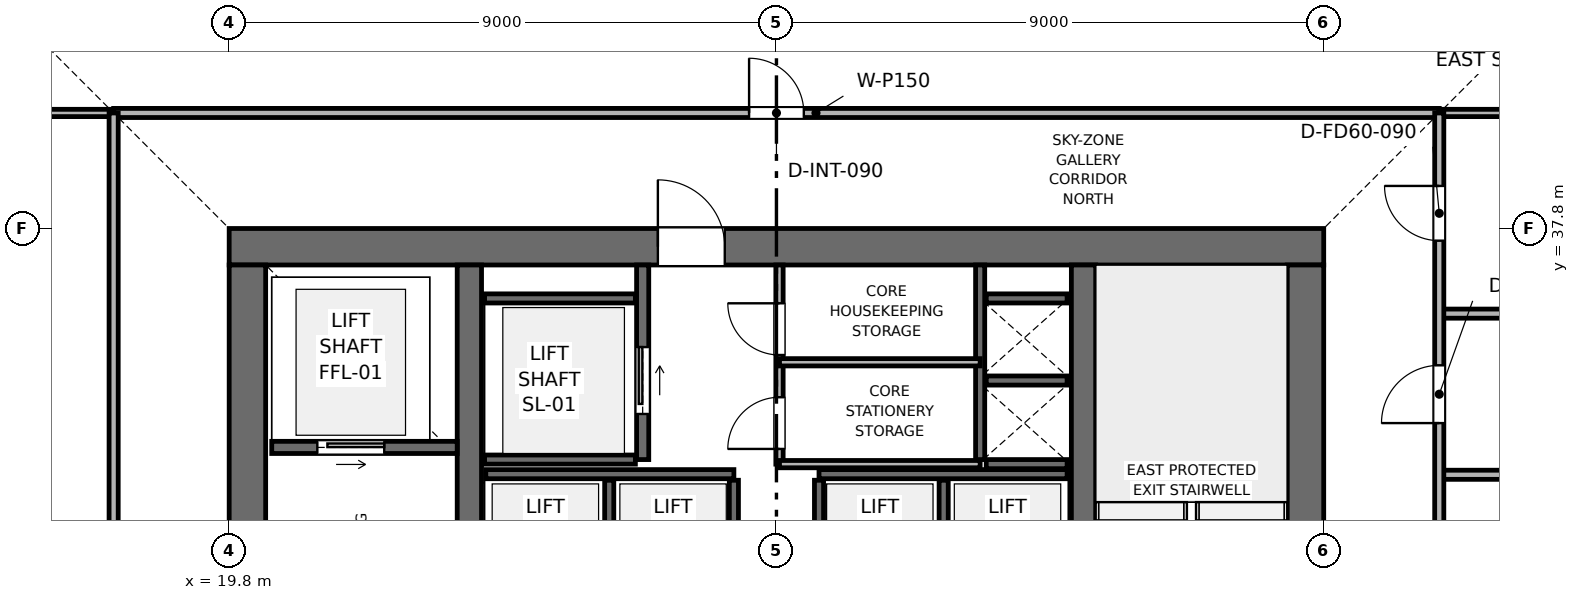
"""IFC4 building model, lengths in metres.
Left out: names, types, materials, properties, quantities, classifications, styles, units other than length and angle.
Written with IfcOpenShell. Run it as: python <this file> out.ifc"""

import sys

from ifc_helpers import new_model, si_unit, direction, frame, frame_2d, origin, place, context, subcontext, project, spatial, rectangle, extrude, element, fill, save


model = new_model("IFC4")
c1 = context("Model", 3, precision=1e-05, world=origin(), true_north=direction((0.0, 1.0)))
c2 = subcontext(c1, "Body", "Model", "MODEL_VIEW")
j1 = project(units=[si_unit("LENGTHUNIT", "METRE"), si_unit("PLANEANGLEUNIT", "RADIAN")], contexts=[c1])
p1 = place(None, origin())
s1 = spatial("IfcSite", under=j1, at=p1, CompositionType="ELEMENT")
p2 = place(p1, origin())
s2 = spatial("IfcBuilding", under=s1, at=p2, CompositionType="ELEMENT")
p3 = place(p2, frame((0.0, 0.0, 295.5)))
s3 = spatial("IfcBuildingStorey", under=s2, at=p3, CompositionType="ELEMENT", Elevation=295.5)
p4 = place(p3, frame((19.8, 37.5, 0.0), z_axis=(0.0, 0.0, 1.0), x_axis=(1.0, 0.0, 0.0)))
e1 = element("IfcWall", 1, at=p4, inside=s3, PredefinedType="SHEAR", context=c2, shape_type="SweptSolid", body=[
    extrude(rectangle(XDim=18.0, YDim=0.6, at=frame_2d((9.0, 0.0))), origin(), (0.0, 0.0, 1.0), 3.75),
])
p5 = place(p4, frame((7.05, 0.0, 0.0)))
e2 = element("IfcOpeningElement", 2, at=p5, cuts=e1, PredefinedType="OPENING", context=c2, shape_type="SweptSolid", body=[
    extrude(rectangle(XDim=1.1, YDim=2.15, at=frame_2d((0.55, 1.075))), frame((0.0, 0.31, 0.0), z_axis=(0.0, -1.0, 0.0), x_axis=(1.0, 0.0, 0.0)), (0.0, 0.0, 1.0), 0.62),
])
p6 = place(p3, frame((20.1, 20.4, 0.0), z_axis=(0.0, 0.0, 1.0), x_axis=(0.0, 1.0, 0.0)))
e3 = element("IfcWall", 3, at=p6, inside=s3, PredefinedType="SHEAR", context=c2, shape_type="SweptSolid", body=[
    extrude(rectangle(XDim=16.8, YDim=0.6, at=frame_2d((8.4, 0.0))), origin(), (0.0, 0.0, 1.0), 3.75),
])
p7 = place(p6, frame((10.4, 0.0, 0.0)))
e4 = element("IfcOpeningElement", 4, at=p7, cuts=e3, PredefinedType="OPENING", context=c2, shape_type="SweptSolid", body=[
    extrude(rectangle(XDim=1.1, YDim=2.15, at=frame_2d((0.55, 1.075))), frame((0.0, 0.31, 0.0), z_axis=(0.0, -1.0, 0.0), x_axis=(1.0, 0.0, 0.0)), (0.0, 0.0, 1.0), 0.62),
])
p8 = place(p3, frame((37.5, 20.4, 0.0), z_axis=(0.0, 0.0, 1.0), x_axis=(0.0, 1.0, 0.0)))
e5 = element("IfcWall", 5, at=p8, inside=s3, PredefinedType="SHEAR", context=c2, shape_type="SweptSolid", body=[
    extrude(rectangle(XDim=16.8, YDim=0.6, at=frame_2d((8.4, 0.0))), origin(), (0.0, 0.0, 1.0), 3.75),
])
p9 = place(p8, frame((4.9, 0.0, 0.0)))
e6 = element("IfcOpeningElement", 6, at=p9, cuts=e5, PredefinedType="OPENING", context=c2, shape_type="SweptSolid", body=[
    extrude(rectangle(XDim=1.1, YDim=2.15, at=frame_2d((0.55, 1.075))), frame((0.0, 0.31, 0.0), z_axis=(0.0, -1.0, 0.0), x_axis=(1.0, 0.0, 0.0)), (0.0, 0.0, 1.0), 0.62),
])
for number, where, z_axis, x_axis in (
    (7, (23.75, 20.4, 0.0), (0.0, 0.0, 1.0), (0.0, 1.0, 0.0)),
    (8, (33.85, 20.4, 0.0), (0.0, 0.0, 1.0), (0.0, 1.0, 0.0)),
):
    element("IfcWall", number, at=place(p3, frame(where, z_axis=z_axis, x_axis=x_axis)), inside=s3, PredefinedType="SHEAR", context=c2, shape_type="SweptSolid", body=[
        extrude(rectangle(XDim=16.8, YDim=0.4, at=frame_2d((8.4, 0.0))), origin(), (0.0, 0.0, 1.0), 3.75),
    ])
p10 = place(p3, frame((32.15, 34.0, 0.0), z_axis=(0.0, 0.0, 1.0), x_axis=(0.0, 1.0, 0.0)))
e9 = element("IfcWall", 9, at=p10, inside=s3, PredefinedType="SHEAR", context=c2, shape_type="SweptSolid", body=[
    extrude(rectangle(XDim=3.2, YDim=0.15, at=frame_2d((1.6, 0.0))), origin(), (0.0, 0.0, 1.0), 3.51),
])
for number, where, z_axis, x_axis in (
    (10, (32.25, 33.925, 0.0), (0.0, 0.0, 1.0), (1.0, 0.0, 0.0)),
    (11, (32.25, 35.3, 0.0), (0.0, 0.0, 1.0), (1.0, 0.0, 0.0)),
):
    element("IfcWall", number, at=place(p3, frame(where, z_axis=z_axis, x_axis=x_axis)), inside=s3, PredefinedType="SHEAR", context=c2, shape_type="SweptSolid", body=[
        extrude(rectangle(XDim=1.33, YDim=0.15, at=frame_2d((0.665, 0.0))), origin(), (0.0, 0.0, 1.0), 3.51),
    ])
p11 = place(p3, frame((20.5, 34.2, 0.0), z_axis=(0.0, 0.0, 1.0), x_axis=(1.0, 0.0, 0.0)))
e12 = element("IfcWall", 12, at=p11, inside=s3, PredefinedType="SHEAR", context=c2, shape_type="SweptSolid", body=[
    extrude(rectangle(XDim=3.05, YDim=0.2, at=frame_2d((1.525, 0.0))), origin(), (0.0, 0.0, 1.0), 3.51),
])
p12 = place(p11, frame((0.75, 0.0, 0.0)))
e13 = element("IfcOpeningElement", 13, at=p12, cuts=e12, PredefinedType="OPENING", context=c2, shape_type="SweptSolid", body=[
    extrude(rectangle(XDim=1.1, YDim=2.15, at=frame_2d((0.55, 1.075))), frame((0.0, 0.11, 0.0), z_axis=(0.0, -1.0, 0.0), x_axis=(1.0, 0.0, 0.0)), (0.0, 0.0, 1.0), 0.22),
])
p13 = place(p3, frame((26.6, 34.0, 0.0), z_axis=(0.0, 0.0, 1.0), x_axis=(0.0, 1.0, 0.0)))
e14 = element("IfcWall", 14, at=p13, inside=s3, PredefinedType="SHEAR", context=c2, shape_type="SweptSolid", body=[
    extrude(rectangle(XDim=3.2, YDim=0.2, at=frame_2d((1.6, 0.0))), origin(), (0.0, 0.0, 1.0), 3.51),
])
p14 = place(p13, frame((0.75, 0.0, 0.0)))
e15 = element("IfcOpeningElement", 15, at=p14, cuts=e14, PredefinedType="OPENING", context=c2, shape_type="SweptSolid", body=[
    extrude(rectangle(XDim=1.1, YDim=2.15, at=frame_2d((0.55, 1.075))), frame((0.0, 0.11, 0.0), z_axis=(0.0, -1.0, 0.0), x_axis=(1.0, 0.0, 0.0)), (0.0, 0.0, 1.0), 0.22),
])
for number, where, z_axis, x_axis in (
    (16, (24.0, 34.0, 0.0), (0.0, 0.0, 1.0), (1.0, 0.0, 0.0)),
    (17, (24.0, 36.65, 0.0), (0.0, 0.0, 1.0), (1.0, 0.0, 0.0)),
):
    element("IfcWall", number, at=place(p3, frame(where, z_axis=z_axis, x_axis=x_axis)), inside=s3, PredefinedType="SHEAR", context=c2, shape_type="SweptSolid", body=[
        extrude(rectangle(XDim=2.48, YDim=0.15, at=frame_2d((1.24, 0.0))), origin(), (0.0, 0.0, 1.0), 3.51),
    ])
p15 = place(p3, frame((32.25, 36.65, 0.0), z_axis=(0.0, 0.0, 1.0), x_axis=(1.0, 0.0, 0.0)))
e18 = element("IfcWall", 18, at=p15, inside=s3, PredefinedType="SHEAR", context=c2, shape_type="SweptSolid", body=[
    extrude(rectangle(XDim=1.33, YDim=0.15, at=frame_2d((0.665, 0.0))), origin(), (0.0, 0.0, 1.0), 3.51),
])
for number, where, z_axis, x_axis in (
    (19, (24.02, 33.76, 0.0), (0.0, 0.0, 1.0), (1.0, 0.0, 0.0)),
    (20, (29.5, 33.76, 0.0), (0.0, 0.0, 1.0), (1.0, 0.0, 0.0)),
):
    element("IfcWall", number, at=place(p3, frame(where, z_axis=z_axis, x_axis=x_axis)), inside=s3, PredefinedType="SHEAR", context=c2, shape_type="SweptSolid", body=[
        extrude(rectangle(XDim=4.08, YDim=0.15, at=frame_2d((2.04, 0.0))), origin(), (0.0, 0.0, 1.0), 3.51),
    ])
for number, where, z_axis, x_axis in (
    (21, (26.05, 31.42, 0.0), (0.0, 0.0, 1.0), (0.0, 1.0, 0.0)),
    (22, (28.1, 31.42, 0.0), (0.0, 0.0, 1.0), (0.0, 1.0, 0.0)),
    (23, (29.5, 31.42, 0.0), (0.0, 0.0, 1.0), (0.0, 1.0, 0.0)),
    (24, (31.55, 31.42, 0.0), (0.0, 0.0, 1.0), (0.0, 1.0, 0.0)),
):
    element("IfcWall", number, at=place(p3, frame(where, z_axis=z_axis, x_axis=x_axis)), inside=s3, PredefinedType="SHEAR", context=c2, shape_type="SweptSolid", body=[
        extrude(rectangle(XDim=2.24, YDim=0.15, at=frame_2d((1.12, 0.0))), origin(), (0.0, 0.0, 1.0), 3.51),
    ])
p16 = place(p3, frame((28.85, 33.925, 0.0), z_axis=(0.0, 0.0, 1.0), x_axis=(0.0, 1.0, 0.0)))
e25 = element("IfcWall", 25, at=p16, inside=s3, PredefinedType="PARTITIONING", context=c2, shape_type="SweptSolid", body=[
    extrude(rectangle(XDim=3.275, YDim=0.12, at=frame_2d((1.637, 0.0))), origin(), (0.0, 0.0, 1.0), 3.51),
])
p17 = place(p16, frame((0.25, 0.0, 0.0)))
e26 = element("IfcOpeningElement", 26, at=p17, cuts=e25, PredefinedType="OPENING", context=c2, shape_type="SweptSolid", body=[
    extrude(rectangle(XDim=0.85, YDim=2.1, at=frame_2d((0.425, 1.05))), frame((0.0, 0.07, 0.0), z_axis=(0.0, -1.0, 0.0), x_axis=(1.0, 0.0, 0.0)), (0.0, 0.0, 1.0), 0.14),
])
p18 = place(p16, frame((1.795, 0.0, 0.0)))
e27 = element("IfcOpeningElement", 27, at=p18, cuts=e25, PredefinedType="OPENING", context=c2, shape_type="SweptSolid", body=[
    extrude(rectangle(XDim=0.85, YDim=2.1, at=frame_2d((0.425, 1.05))), frame((0.0, 0.07, 0.0), z_axis=(0.0, -1.0, 0.0), x_axis=(1.0, 0.0, 0.0)), (0.0, 0.0, 1.0), 0.14),
])
for number, where, z_axis, x_axis in (
    (28, (28.85, 35.6, 0.0), (0.0, 0.0, 1.0), (1.0, 0.0, 0.0)),
    (29, (28.85, 33.925, 0.0), (0.0, 0.0, 1.0), (1.0, 0.0, 0.0)),
):
    element("IfcWall", number, at=place(p3, frame(where, z_axis=z_axis, x_axis=x_axis)), inside=s3, PredefinedType="PARTITIONING", context=c2, shape_type="SweptSolid", body=[
        extrude(rectangle(XDim=3.3, YDim=0.12, at=frame_2d((1.65, 0.0))), origin(), (0.0, 0.0, 1.0), 3.51),
    ])
for number, where, z_axis, x_axis in (
    (30, (39.7, 36.4, 0.0), (0.0, 0.0, 1.0), (1.0, 0.0, 0.0)),
    (31, (39.7, 33.75, 0.0), (0.0, 0.0, 1.0), (1.0, 0.0, 0.0)),
):
    element("IfcWall", number, at=place(p3, frame(where, z_axis=z_axis, x_axis=x_axis)), inside=s3, PredefinedType="PARTITIONING", context=c2, shape_type="SweptSolid", body=[
        extrude(rectangle(XDim=3.1, YDim=0.15, at=frame_2d((1.55, 0.0))), origin(), (0.0, 0.0, 1.0), 3.135),
    ])
for number, where, z_axis, x_axis in (
    (32, (6.13, 39.7, 0.0), (0.0, 0.0, 1.0), (1.0, 0.0, 0.0)),
    (33, (39.7, 39.7, 0.0), (0.0, 0.0, 1.0), (1.0, 0.0, 0.0)),
):
    element("IfcWall", number, at=place(p3, frame(where, z_axis=z_axis, x_axis=x_axis)), inside=s3, PredefinedType="PARTITIONING", context=c2, shape_type="SweptSolid", body=[
        extrude(rectangle(XDim=11.77, YDim=0.12, at=frame_2d((5.885, 0.0))), origin(), (0.0, 0.0, 1.0), 3.095),
    ])
p19 = place(p3, frame((17.9, 39.7, 0.0), z_axis=(0.0, 0.0, 1.0), x_axis=(1.0, 0.0, 0.0)))
e34 = element("IfcWall", 34, at=p19, inside=s3, PredefinedType="PARTITIONING", context=c2, shape_type="SweptSolid", body=[
    extrude(rectangle(XDim=21.8, YDim=0.15, at=frame_2d((10.9, 0.0))), origin(), (0.0, 0.0, 1.0), 3.095),
])
p20 = place(p19, frame((10.45, 0.0, 0.0)))
e35 = element("IfcOpeningElement", 35, at=p20, cuts=e34, PredefinedType="OPENING", context=c2, shape_type="SweptSolid", body=[
    extrude(rectangle(XDim=0.9, YDim=2.1, at=frame_2d((0.45, 1.05))), frame((0.0, 0.085, 0.0), z_axis=(0.0, -1.0, 0.0), x_axis=(1.0, 0.0, 0.0)), (0.0, 0.0, 1.0), 0.17),
])
p21 = place(p3, frame((17.9, 12.3, 0.0), z_axis=(0.0, 0.0, 1.0), x_axis=(0.0, 1.0, 0.0)))
e36 = element("IfcWall", 36, at=p21, inside=s3, PredefinedType="PARTITIONING", context=c2, shape_type="SweptSolid", body=[
    extrude(rectangle(XDim=27.4, YDim=0.15, at=frame_2d((13.7, 0.0))), origin(), (0.0, 0.0, 1.0), 3.095),
])
p22 = place(p21, frame((1.498, 0.0, 0.0)))
e37 = element("IfcOpeningElement", 37, at=p22, cuts=e36, PredefinedType="OPENING", context=c2, shape_type="SweptSolid", body=[
    extrude(rectangle(XDim=0.9, YDim=2.1, at=frame_2d((0.45, 1.05))), frame((0.0, 0.085, 0.0), z_axis=(0.0, -1.0, 0.0), x_axis=(1.0, 0.0, 0.0)), (0.0, 0.0, 1.0), 0.17),
])
p23 = place(p21, frame((15.198, 0.0, 0.0)))
e38 = element("IfcOpeningElement", 38, at=p23, cuts=e36, PredefinedType="OPENING", context=c2, shape_type="SweptSolid", body=[
    extrude(rectangle(XDim=0.9, YDim=2.1, at=frame_2d((0.45, 1.05))), frame((0.0, 0.085, 0.0), z_axis=(0.0, -1.0, 0.0), x_axis=(1.0, 0.0, 0.0)), (0.0, 0.0, 1.0), 0.17),
])
p24 = place(p3, frame((39.7, 24.4, 0.0), z_axis=(0.0, 0.0, 1.0), x_axis=(0.0, 1.0, 0.0)))
e39 = element("IfcWall", 39, at=p24, inside=s3, PredefinedType="PARTITIONING", context=c2, shape_type="SweptSolid", body=[
    extrude(rectangle(XDim=15.3, YDim=0.15, at=frame_2d((7.65, 0.0))), origin(), (0.0, 0.0, 1.0), 3.095),
])
p25 = place(p24, frame((1.35, 0.0, 0.0)))
e40 = element("IfcOpeningElement", 40, at=p25, cuts=e39, PredefinedType="OPENING", context=c2, shape_type="SweptSolid", body=[
    extrude(rectangle(XDim=0.9, YDim=2.1, at=frame_2d((0.45, 1.05))), frame((0.0, 0.085, 0.0), z_axis=(0.0, -1.0, 0.0), x_axis=(1.0, 0.0, 0.0)), (0.0, 0.0, 1.0), 0.17),
])
p26 = place(p24, frame((4.55, 0.0, 0.0)))
e41 = element("IfcOpeningElement", 41, at=p26, cuts=e39, PredefinedType="OPENING", context=c2, shape_type="SweptSolid", body=[
    extrude(rectangle(XDim=0.9, YDim=2.1, at=frame_2d((0.45, 1.05))), frame((0.0, 0.085, 0.0), z_axis=(0.0, -1.0, 0.0), x_axis=(1.0, 0.0, 0.0)), (0.0, 0.0, 1.0), 0.17),
])
p27 = place(p24, frame((7.45, 0.0, 0.0)))
e42 = element("IfcOpeningElement", 42, at=p27, cuts=e39, PredefinedType="OPENING", context=c2, shape_type="SweptSolid", body=[
    extrude(rectangle(XDim=0.9, YDim=2.1, at=frame_2d((0.45, 1.05))), frame((0.0, 0.085, 0.0), z_axis=(0.0, -1.0, 0.0), x_axis=(1.0, 0.0, 0.0)), (0.0, 0.0, 1.0), 0.17),
])
p28 = place(p24, frame((10.2, 0.0, 0.0)))
e43 = element("IfcOpeningElement", 43, at=p28, cuts=e39, PredefinedType="OPENING", context=c2, shape_type="SweptSolid", body=[
    extrude(rectangle(XDim=0.95, YDim=2.1, at=frame_2d((0.475, 1.05))), frame((0.0, 0.085, 0.0), z_axis=(0.0, -1.0, 0.0), x_axis=(1.0, 0.0, 0.0)), (0.0, 0.0, 1.0), 0.17),
])
p29 = place(p24, frame((13.2, 0.0, 0.0)))
e44 = element("IfcOpeningElement", 44, at=p29, cuts=e39, PredefinedType="OPENING", context=c2, shape_type="SweptSolid", body=[
    extrude(rectangle(XDim=0.9, YDim=2.1, at=frame_2d((0.45, 1.05))), frame((0.0, 0.085, 0.0), z_axis=(0.0, -1.0, 0.0), x_axis=(1.0, 0.0, 0.0)), (0.0, 0.0, 1.0), 0.17),
])
p30 = place(p12, origin())
e45 = element("IfcDoor", 45, at=p30, inside=s3, OperationType="SLIDING_TO_RIGHT", PredefinedType="DOOR", context=c2, shape_type="SweptSolid", body=[
    extrude(rectangle(XDim=1.1, YDim=2.15, at=frame_2d((0.55, 1.075))), frame((0.0, 0.025, 0.0), z_axis=(0.0, -1.0, 0.0), x_axis=(1.0, 0.0, 0.0)), (0.0, 0.0, 1.0), 0.05),
])
fill(e13, e45)
p31 = place(p14, origin())
e46 = element("IfcDoor", 46, at=p31, inside=s3, OperationType="SLIDING_TO_RIGHT", PredefinedType="DOOR", context=c2, shape_type="SweptSolid", body=[
    extrude(rectangle(XDim=1.1, YDim=2.15, at=frame_2d((0.55, 1.075))), frame((0.0, 0.025, 0.0), z_axis=(0.0, -1.0, 0.0), x_axis=(1.0, 0.0, 0.0)), (0.0, 0.0, 1.0), 0.05),
])
fill(e15, e46)
p32 = place(p17, origin())
e47 = element("IfcDoor", 47, at=p32, inside=s3, OperationType="SINGLE_SWING_LEFT", PredefinedType="DOOR", context=c2, shape_type="SweptSolid", body=[
    extrude(rectangle(XDim=0.85, YDim=2.1, at=frame_2d((0.425, 1.05))), frame((0.0, 0.025, 0.0), z_axis=(0.0, -1.0, 0.0), x_axis=(1.0, 0.0, 0.0)), (0.0, 0.0, 1.0), 0.05),
])
fill(e26, e47)
p33 = place(p18, origin())
e48 = element("IfcDoor", 48, at=p33, inside=s3, OperationType="SINGLE_SWING_RIGHT", PredefinedType="DOOR", context=c2, shape_type="SweptSolid", body=[
    extrude(rectangle(XDim=0.85, YDim=2.1, at=frame_2d((0.425, 1.05))), frame((0.0, 0.025, 0.0), z_axis=(0.0, -1.0, 0.0), x_axis=(1.0, 0.0, 0.0)), (0.0, 0.0, 1.0), 0.05),
])
fill(e27, e48)
p34 = place(p20, origin())
e49 = element("IfcDoor", 49, at=p34, inside=s3, OperationType="SINGLE_SWING_LEFT", PredefinedType="DOOR", context=c2, shape_type="SweptSolid", body=[
    extrude(rectangle(XDim=0.9, YDim=2.1, at=frame_2d((0.45, 1.05))), frame((0.0, 0.025, 0.0), z_axis=(0.0, -1.0, 0.0), x_axis=(1.0, 0.0, 0.0)), (0.0, 0.0, 1.0), 0.05),
])
fill(e35, e49)
p35 = place(p28, origin())
e50 = element("IfcDoor", 50, at=p35, inside=s3, OperationType="SINGLE_SWING_LEFT", PredefinedType="DOOR", context=c2, shape_type="SweptSolid", body=[
    extrude(rectangle(XDim=0.95, YDim=2.1, at=frame_2d((0.475, 1.05))), frame((0.0, 0.025, 0.0), z_axis=(0.0, -1.0, 0.0), x_axis=(1.0, 0.0, 0.0)), (0.0, 0.0, 1.0), 0.05),
])
fill(e43, e50)
p36 = place(p29, origin())
e51 = element("IfcDoor", 51, at=p36, inside=s3, OperationType="SINGLE_SWING_RIGHT", PredefinedType="DOOR", context=c2, shape_type="SweptSolid", body=[
    extrude(rectangle(XDim=0.9, YDim=2.1, at=frame_2d((0.45, 1.05))), frame((0.0, 0.025, 0.0), z_axis=(0.0, -1.0, 0.0), x_axis=(1.0, 0.0, 0.0)), (0.0, 0.0, 1.0), 0.05),
])
fill(e44, e51)
p37 = place(p5, origin())
e52 = element("IfcDoor", 52, at=p37, inside=s3, OperationType="SINGLE_SWING_LEFT", PredefinedType="DOOR", context=c2, shape_type="SweptSolid", body=[
    extrude(rectangle(XDim=1.1, YDim=2.15, at=frame_2d((0.55, 1.075))), frame((0.0, 0.025, 0.0), z_axis=(0.0, -1.0, 0.0), x_axis=(1.0, 0.0, 0.0)), (0.0, 0.0, 1.0), 0.05),
])
fill(e2, e52)
save(model, sys.argv[1])
